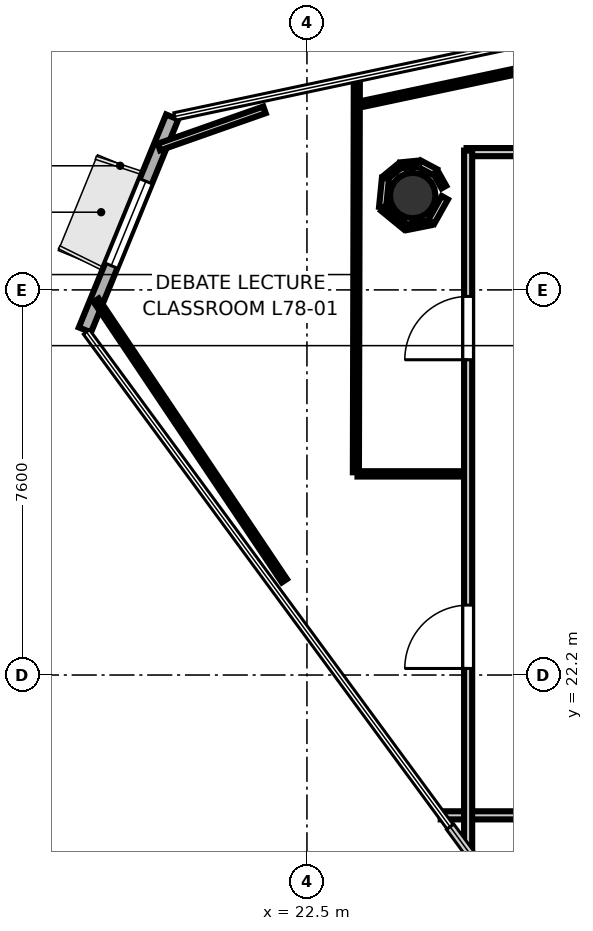
"""IFC4 building model, lengths in metres.
Left out: names, types, materials, properties, quantities, classifications, styles, units other than length and angle.
Written with IfcOpenShell. Run it as: python <this file> out.ifc"""

import sys

from ifc_helpers import new_model, si_unit, direction, frame, frame_2d, origin, origin_2d, place, context, subcontext, project, spatial, rectangle, hollow_circle, extrude, element, fill, save


model = new_model("IFC4")
c1 = context("Model", 3, precision=1e-05, world=origin(), true_north=direction((0.0, 1.0)))
c2 = subcontext(c1, "Body", "Model", "MODEL_VIEW")
j1 = project(units=[si_unit("LENGTHUNIT", "METRE"), si_unit("PLANEANGLEUNIT", "RADIAN")], contexts=[c1])
p1 = place(None, origin())
s1 = spatial("IfcSite", under=j1, at=p1, CompositionType="ELEMENT")
p2 = place(p1, origin())
s2 = spatial("IfcBuilding", under=s1, at=p2, CompositionType="ELEMENT")
p3 = place(p2, frame((0.0, 0.0, 302.8)))
s3 = spatial("IfcBuildingStorey", under=s2, at=p3, CompositionType="ELEMENT", Elevation=302.8)
p4 = place(p3, frame((24.587, 31.663, 0.0), z_axis=(0.0, 0.0, 1.0), x_axis=(1.0, 0.0, 0.0)))
e1 = element("IfcColumn", 1, at=p4, inside=s3, PredefinedType="COLUMN", context=c2, shape_type="SweptSolid", body=[
    extrude(hollow_circle(Radius=0.45, WallThickness=0.025, at=origin_2d()), origin(), (0.0, 0.0, 1.0), 3.7),
])
p5 = place(p3, frame((19.841, 33.212, 0.0), z_axis=(0.0, 0.0, 1.0), x_axis=(-0.379356962743, -0.925250395741, 0.0)))
e2 = element("IfcWall", 2, at=p5, inside=s3, PredefinedType="SOLIDWALL", context=c2, shape_type="SweptSolid", body=[
    extrude(rectangle(XDim=4.542, YDim=0.26, at=frame_2d((2.271, 0.0))), origin(), (0.0, 0.0, 1.0), 3.52),
])
p6 = place(p5, frame((1.371, 0.0, 0.85)))
e3 = element("IfcOpeningElement", 3, at=p6, cuts=e2, PredefinedType="OPENING", context=c2, shape_type="SweptSolid", body=[
    extrude(rectangle(XDim=1.8, YDim=2.1, at=frame_2d((0.9, 1.05))), frame((0.0, 0.14, 0.0), z_axis=(0.0, -1.0, 0.0), x_axis=(1.0, 0.0, 0.0)), (0.0, 0.0, 1.0), 0.28),
])
p7 = place(p3, frame((25.65, 32.519, 0.0), z_axis=(0.0, 0.0, 1.0), x_axis=(1.0, 0.0, 0.0)))
e4 = element("IfcWall", 4, at=p7, inside=s3, PredefinedType="PARTITIONING", context=c2, shape_type="SweptSolid", body=[
    extrude(rectangle(XDim=1.97, YDim=0.16, at=frame_2d((0.985, 0.0))), origin(), (0.0, 0.0, 1.0), 2.84),
])
p8 = place(p3, frame((29.8, 19.431, 0.0), z_axis=(0.0, 0.0, 1.0), x_axis=(-1.0, 0.0, 0.0)))
e5 = element("IfcWall", 5, at=p8, inside=s3, PredefinedType="PARTITIONING", context=c2, shape_type="SweptSolid", body=[
    extrude(rectangle(XDim=4.66, YDim=0.16, at=frame_2d((2.33, 0.0))), origin(), (0.0, 0.0, 1.0), 2.84),
])
p9 = place(p3, frame((25.681, 18.702, 0.0), z_axis=(0.0, 0.0, 1.0), x_axis=(0.0, 1.0, 0.0)))
e6 = element("IfcWall", 6, at=p9, inside=s3, PredefinedType="PARTITIONING", context=c2, shape_type="SweptSolid", body=[
    extrude(rectangle(XDim=13.848, YDim=0.16, at=frame_2d((6.924, 0.0))), origin(), (0.0, 0.0, 1.0), 2.84),
])
p10 = place(p9, frame((3.627, 0.0, 0.0)))
e7 = element("IfcOpeningElement", 7, at=p10, cuts=e6, PredefinedType="OPENING", context=c2, shape_type="SweptSolid", body=[
    extrude(rectangle(XDim=1.25, YDim=2.2, at=frame_2d((0.625, 1.1))), frame((0.0, 0.09, 0.0), z_axis=(0.0, -1.0, 0.0), x_axis=(1.0, 0.0, 0.0)), (0.0, 0.0, 1.0), 0.18),
])
p11 = place(p9, frame((9.72, 0.0, 0.0)))
e8 = element("IfcOpeningElement", 8, at=p11, cuts=e6, PredefinedType="OPENING", context=c2, shape_type="SweptSolid", body=[
    extrude(rectangle(XDim=1.25, YDim=2.2, at=frame_2d((0.625, 1.1))), frame((0.0, 0.09, 0.0), z_axis=(0.0, -1.0, 0.0), x_axis=(1.0, 0.0, 0.0)), (0.0, 0.0, 1.0), 0.18),
])
p12 = place(p3, frame((23.484, 34.005, 0.0), z_axis=(0.0, 0.0, 1.0), x_axis=(-0.002377445028, -0.999997173874, 0.0)))
e9 = element("IfcWall", 9, at=p12, inside=s3, PredefinedType="PARTITIONING", context=c2, shape_type="SweptSolid", body=[
    extrude(rectangle(XDim=7.804, YDim=0.12, at=frame_2d((3.902, 0.0))), origin(), (0.0, 0.0, 1.0), 2.84),
])
p13 = place(p3, frame((23.497, 26.169, 0.0), z_axis=(0.0, 0.0, 1.0), x_axis=(1.0, 0.0, 0.0)))
e10 = element("IfcWall", 10, at=p13, inside=s3, PredefinedType="PARTITIONING", context=c2, shape_type="SweptSolid", body=[
    extrude(rectangle(XDim=2.073, YDim=0.105, at=frame_2d((1.037, 0.0))), origin(), (0.0, 0.0, 1.0), 2.84),
])
p14 = place(p3, frame((22.054, 24.061, 0.0), z_axis=(0.0, 0.0, 1.0), x_axis=(-0.557190761307, 0.830384522684, 0.0)))
e11 = element("IfcWall", 11, at=p14, inside=s3, PredefinedType="PARTITIONING", context=c2, shape_type="SweptSolid", body=[
    extrude(rectangle(XDim=6.667, YDim=0.12, at=frame_2d((3.333, 0.0))), origin(), (0.0, 0.0, 1.0), 2.84),
])
p15 = place(p3, frame((19.58, 32.62, 0.0), z_axis=(0.0, 0.0, 1.0), x_axis=(0.943196306514, 0.332235951363, 0.0)))
e12 = element("IfcWall", 12, at=p15, inside=s3, PredefinedType="PARTITIONING", context=c2, shape_type="SweptSolid", body=[
    extrude(rectangle(XDim=2.208, YDim=0.14, at=frame_2d((1.104, 0.0))), origin(), (0.0, 0.0, 1.0), 2.84),
])
p16 = place(p3, frame((25.203, 31.829, 0.0), z_axis=(0.0, 0.0, 1.0), x_axis=(-0.488926990846, 0.872324708823, 0.0)))
e13 = element("IfcWall", 13, at=p16, inside=s3, PredefinedType="PARTITIONING", context=c2, shape_type="SweptSolid", body=[
    extrude(rectangle(XDim=0.322, YDim=0.105, at=frame_2d((0.161, 0.0))), origin(), (0.0, 0.0, 1.0), 2.84),
])
p17 = place(p3, frame((25.033, 32.122, 0.0), z_axis=(0.0, 0.0, 1.0), x_axis=(-0.881817981942, 0.471589913721, 0.0)))
e14 = element("IfcWall", 14, at=p17, inside=s3, PredefinedType="PARTITIONING", context=c2, shape_type="SweptSolid", body=[
    extrude(rectangle(XDim=0.354, YDim=0.14, at=frame_2d((0.177, 0.0))), origin(), (0.0, 0.0, 1.0), 2.84),
])
p18 = place(p3, frame((24.703, 32.292, 0.0), z_axis=(0.0, 0.0, 1.0), x_axis=(-0.995193004206, -0.097933060705, 0.0)))
e15 = element("IfcWall", 15, at=p18, inside=s3, PredefinedType="PARTITIONING", context=c2, shape_type="SweptSolid", body=[
    extrude(rectangle(XDim=0.354, YDim=0.12, at=frame_2d((0.177, 0.0))), origin(), (0.0, 0.0, 1.0), 2.84),
])
p19 = place(p3, frame((24.334, 32.25, 0.0), z_axis=(0.0, 0.0, 1.0), x_axis=(-0.773281307259, -0.634063103992, 0.0)))
e16 = element("IfcWall", 16, at=p19, inside=s3, PredefinedType="PARTITIONING", context=c2, shape_type="SweptSolid", body=[
    extrude(rectangle(XDim=0.354, YDim=0.105, at=frame_2d((0.177, 0.0))), origin(), (0.0, 0.0, 1.0), 2.84),
])
p20 = place(p3, frame((24.049, 32.005, 0.0), z_axis=(0.0, 0.0, 1.0), x_axis=(-0.098074389493, -0.995179086459, 0.0)))
e17 = element("IfcWall", 17, at=p20, inside=s3, PredefinedType="PARTITIONING", context=c2, shape_type="SweptSolid", body=[
    extrude(rectangle(XDim=0.575, YDim=0.14, at=frame_2d((0.288, 0.0))), origin(), (0.0, 0.0, 1.0), 2.84),
])
p21 = place(p3, frame((24.004, 31.406, 0.0), z_axis=(0.0, 0.0, 1.0), x_axis=(0.772934514443, -0.634485804713, 0.0)))
e18 = element("IfcWall", 18, at=p21, inside=s3, PredefinedType="PARTITIONING", context=c2, shape_type="SweptSolid", body=[
    extrude(rectangle(XDim=0.575, YDim=0.12, at=frame_2d((0.288, 0.0))), origin(), (0.0, 0.0, 1.0), 2.84),
])
p22 = place(p3, frame((24.474, 31.034, 0.0), z_axis=(0.0, 0.0, 1.0), x_axis=(0.980681129405, 0.195613195945, 0.0)))
e19 = element("IfcWall", 19, at=p22, inside=s3, PredefinedType="PARTITIONING", context=c2, shape_type="SweptSolid", body=[
    extrude(rectangle(XDim=0.467, YDim=0.105, at=frame_2d((0.233, 0.0))), origin(), (0.0, 0.0, 1.0), 2.84),
])
p23 = place(p3, frame((24.953, 31.141, 0.0), z_axis=(0.0, 0.0, 1.0), x_axis=(0.489267492682, 0.872133774489, 0.0)))
e20 = element("IfcWall", 20, at=p23, inside=s3, PredefinedType="PARTITIONING", context=c2, shape_type="SweptSolid", body=[
    extrude(rectangle(XDim=0.548, YDim=0.14, at=frame_2d((0.274, 0.0))), origin(), (0.0, 0.0, 1.0), 2.84),
])
p24 = place(p3, frame((23.581, 33.468, 0.0), z_axis=(0.0, 0.0, 1.0), x_axis=(0.978268763822, 0.207340844336, 0.0)))
e21 = element("IfcWall", 21, at=p24, inside=s3, PredefinedType="PARTITIONING", context=c2, shape_type="SweptSolid", body=[
    extrude(rectangle(XDim=5.114, YDim=0.12, at=frame_2d((2.557, 0.0))), origin(), (0.0, 0.0, 1.0), 2.84),
])
p25 = place(p10, origin())
e22 = element("IfcDoor", 22, at=p25, inside=s3, OperationType="SINGLE_SWING_LEFT", PredefinedType="DOOR", context=c2, shape_type="SweptSolid", body=[
    extrude(rectangle(XDim=1.25, YDim=2.2, at=frame_2d((0.625, 1.1))), frame((0.0, 0.025, 0.0), z_axis=(0.0, -1.0, 0.0), x_axis=(1.0, 0.0, 0.0)), (0.0, 0.0, 1.0), 0.05),
])
fill(e7, e22)
p26 = place(p11, origin())
e23 = element("IfcDoor", 23, at=p26, inside=s3, OperationType="SINGLE_SWING_LEFT", PredefinedType="DOOR", context=c2, shape_type="SweptSolid", body=[
    extrude(rectangle(XDim=1.25, YDim=2.2, at=frame_2d((0.625, 1.1))), frame((0.0, 0.025, 0.0), z_axis=(0.0, -1.0, 0.0), x_axis=(1.0, 0.0, 0.0)), (0.0, 0.0, 1.0), 0.05),
])
fill(e8, e23)
p27 = place(p6, origin())
e24 = element("IfcWindow", 24, at=p27, inside=s3, PartitioningType="SINGLE_PANEL", PredefinedType="WINDOW", context=c2, shape_type="SweptSolid", body=[
    extrude(rectangle(XDim=1.8, YDim=2.1, at=frame_2d((0.9, 1.05))), frame((0.0, 0.03, 0.0), z_axis=(0.0, -1.0, 0.0), x_axis=(1.0, 0.0, 0.0)), (0.0, 0.0, 1.0), 0.06),
])
fill(e3, e24)
save(model, sys.argv[1])
